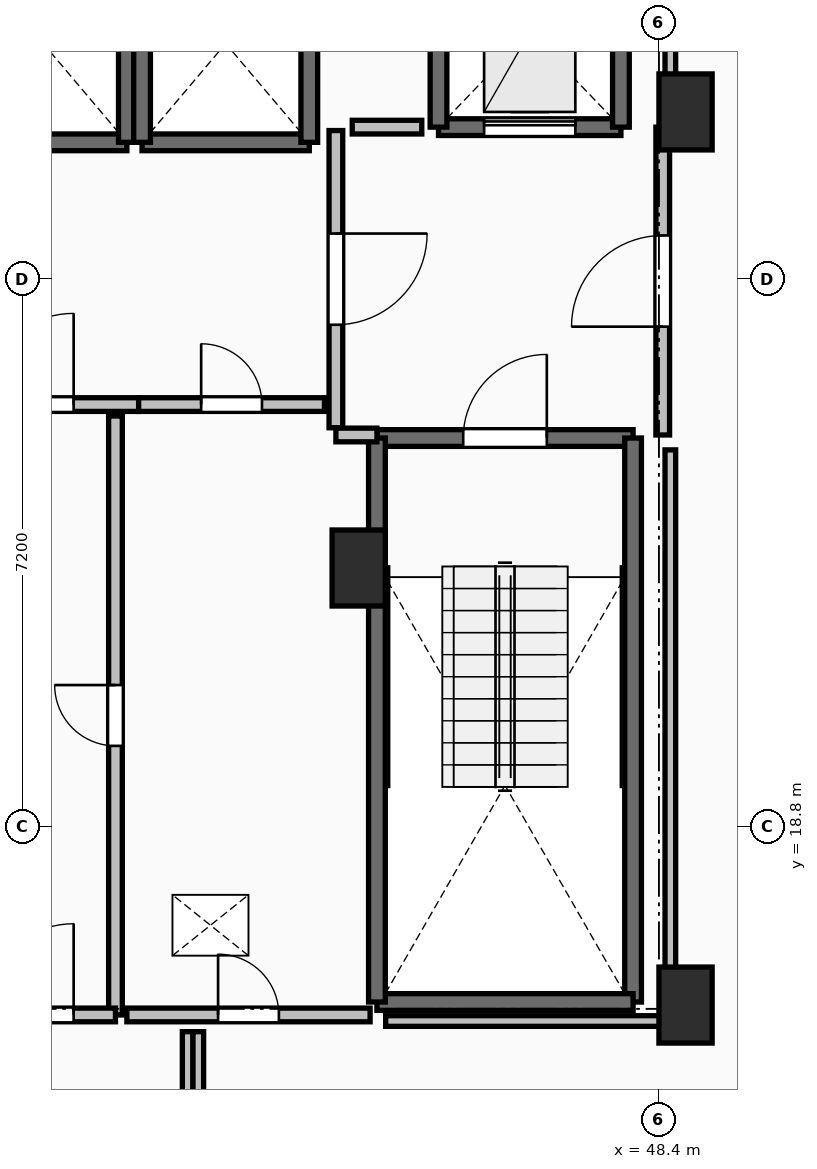
"""IFC4 building model, lengths in metres.
Left out: names, types, materials, properties, quantities, classifications, styles, units other than length and angle.
Written with IfcOpenShell. Run it as: python <this file> out.ifc"""

import sys

from ifc_helpers import new_model, si_unit, direction, frame, frame_2d, origin, origin_2d, place, context, subcontext, project, spatial, rectangle, extrude, element, fill, save


model = new_model("IFC4")
c1 = context("Model", 3, precision=1e-05, world=origin(), true_north=direction((0.0, 1.0)))
c2 = subcontext(c1, "Body", "Model", "MODEL_VIEW")
j1 = project(units=[si_unit("LENGTHUNIT", "METRE"), si_unit("PLANEANGLEUNIT", "RADIAN")], contexts=[c1])
p1 = place(None, origin())
s1 = spatial("IfcSite", under=j1, at=p1, CompositionType="ELEMENT")
p2 = place(p1, origin())
s2 = spatial("IfcBuilding", under=s1, at=p2, CompositionType="ELEMENT")
p3 = place(p2, frame((0.0, 0.0, 203.65)))
s3 = spatial("IfcBuildingStorey", under=s2, at=p3, CompositionType="ELEMENT", Elevation=203.65)
for number, where, z_axis, x_axis in (
    (1, (48.75, 28.2, 0.0), (0.0, 0.0, 1.0), (1.0, 0.0, 0.0)),
    (2, (48.75, 16.45, 0.0), (0.0, 0.0, 1.0), (1.0, 0.0, 0.0)),
    (3, (44.45, 22.2, 0.0), (0.0, 0.0, 1.0), (1.0, 0.0, 0.0)),
):
    element("IfcColumn", number, at=place(p3, frame(where, z_axis=z_axis, x_axis=x_axis)), inside=s3, PredefinedType="PILASTER", context=c2, shape_type="SweptSolid", body=[
        extrude(rectangle(XDim=0.7, YDim=1.0, at=origin_2d()), origin(), (0.0, 0.0, 1.0), 3.55),
    ])
p4 = place(p3, frame((44.69, 23.91, 0.0), z_axis=(0.0, 0.0, 1.0), x_axis=(1.0, 0.0, 0.0)))
e4 = element("IfcWall", 4, at=p4, inside=s3, PredefinedType="SOLIDWALL", context=c2, shape_type="SweptSolid", body=[
    extrude(rectangle(XDim=3.37, YDim=0.22, at=frame_2d((1.685, 0.0))), origin(), (0.0, 0.0, 1.0), 3.29),
])
p5 = place(p4, frame((1.135, 0.0, 0.0)))
e5 = element("IfcOpeningElement", 5, at=p5, cuts=e4, PredefinedType="OPENING", context=c2, shape_type="SweptSolid", body=[
    extrude(rectangle(XDim=1.1, YDim=2.15, at=frame_2d((0.55, 1.075))), frame((0.0, 0.125, 0.0), z_axis=(0.0, -1.0, 0.0), x_axis=(1.0, 0.0, 0.0)), (0.0, 0.0, 1.0), 0.25),
])
p6 = place(p3, frame((48.06, 23.91, 0.0), z_axis=(0.0, 0.0, 1.0), x_axis=(0.0, -1.0, 0.0)))
e6 = element("IfcWall", 6, at=p6, inside=s3, PredefinedType="SOLIDWALL", context=c2, shape_type="SweptSolid", body=[
    extrude(rectangle(XDim=7.42, YDim=0.22, at=frame_2d((3.71, 0.0))), origin(), (0.0, 0.0, 1.0), 3.29),
])
p7 = place(p3, frame((48.06, 16.49, 0.0), z_axis=(0.0, 0.0, 1.0), x_axis=(-1.0, 0.0, 0.0)))
e7 = element("IfcWall", 7, at=p7, inside=s3, PredefinedType="SOLIDWALL", context=c2, shape_type="SweptSolid", body=[
    extrude(rectangle(XDim=3.37, YDim=0.22, at=frame_2d((1.685, 0.0))), origin(), (0.0, 0.0, 1.0), 3.29),
])
p8 = place(p3, frame((44.69, 16.49, 0.0), z_axis=(0.0, 0.0, 1.0), x_axis=(0.0, 1.0, 0.0)))
e8 = element("IfcWall", 8, at=p8, inside=s3, PredefinedType="SOLIDWALL", context=c2, shape_type="SweptSolid", body=[
    extrude(rectangle(XDim=7.42, YDim=0.22, at=frame_2d((3.71, 0.0))), origin(), (0.0, 0.0, 1.0), 3.29),
])
p9 = place(p3, frame((39.2, 27.8, 0.0), z_axis=(0.0, 0.0, 1.0), x_axis=(1.0, 0.0, 0.0)))
e9 = element("IfcWall", 9, at=p9, inside=s3, PredefinedType="SOLIDWALL", context=c2, shape_type="SweptSolid", body=[
    extrude(rectangle(XDim=2.2, YDim=0.22, at=frame_2d((1.1, 0.0))), origin(), (0.0, 0.0, 1.0), 3.29),
])
p10 = place(p3, frame((41.4, 27.8, 0.0), z_axis=(0.0, 0.0, 1.0), x_axis=(0.0, 1.0, 0.0)))
e10 = element("IfcWall", 10, at=p10, inside=s3, PredefinedType="SOLIDWALL", context=c2, shape_type="SweptSolid", body=[
    extrude(rectangle(XDim=2.6, YDim=0.22, at=frame_2d((1.3, 0.0))), origin(), (0.0, 0.0, 1.0), 3.29),
])
p11 = place(p3, frame((41.6, 27.8, 0.0), z_axis=(0.0, 0.0, 1.0), x_axis=(1.0, 0.0, 0.0)))
e11 = element("IfcWall", 11, at=p11, inside=s3, PredefinedType="SOLIDWALL", context=c2, shape_type="SweptSolid", body=[
    extrude(rectangle(XDim=2.2, YDim=0.22, at=frame_2d((1.1, 0.0))), origin(), (0.0, 0.0, 1.0), 3.29),
])
for number, where, z_axis, x_axis in (
    (12, (43.8, 27.8, 0.0), (0.0, 0.0, 1.0), (0.0, 1.0, 0.0)),
    (13, (41.6, 30.4, 0.0), (0.0, 0.0, 1.0), (0.0, -1.0, 0.0)),
):
    element("IfcWall", number, at=place(p3, frame(where, z_axis=z_axis, x_axis=x_axis)), inside=s3, PredefinedType="SOLIDWALL", context=c2, shape_type="SweptSolid", body=[
        extrude(rectangle(XDim=2.6, YDim=0.22, at=frame_2d((1.3, 0.0))), origin(), (0.0, 0.0, 1.0), 3.29),
    ])
p12 = place(p3, frame((45.5, 28.0, 0.0), z_axis=(0.0, 0.0, 1.0), x_axis=(1.0, 0.0, 0.0)))
e14 = element("IfcWall", 14, at=p12, inside=s3, PredefinedType="SHEAR", context=c2, shape_type="SweptSolid", body=[
    extrude(rectangle(XDim=2.4, YDim=0.22, at=frame_2d((1.2, 0.0))), origin(), (0.0, 0.0, 1.0), 3.29),
])
p13 = place(p12, frame((0.6, 0.0, 0.0)))
e15 = element("IfcOpeningElement", 15, at=p13, cuts=e14, PredefinedType="OPENING", context=c2, shape_type="SweptSolid", body=[
    extrude(rectangle(XDim=1.2, YDim=2.2, at=frame_2d((0.6, 1.1))), frame((0.0, 0.125, 0.0), z_axis=(0.0, -1.0, 0.0), x_axis=(1.0, 0.0, 0.0)), (0.0, 0.0, 1.0), 0.25),
])
for number, where, z_axis, x_axis in (
    (16, (47.9, 28.0, 0.0), (0.0, 0.0, 1.0), (0.0, 1.0, 0.0)),
    (17, (45.5, 30.5, 0.0), (0.0, 0.0, 1.0), (0.0, -1.0, 0.0)),
):
    element("IfcWall", number, at=place(p3, frame(where, z_axis=z_axis, x_axis=x_axis)), inside=s3, PredefinedType="SHEAR", context=c2, shape_type="SweptSolid", body=[
        extrude(rectangle(XDim=2.5, YDim=0.22, at=frame_2d((1.25, 0.0))), origin(), (0.0, 0.0, 1.0), 3.29),
    ])
p14 = place(p3, frame((44.15, 27.955, 0.0), z_axis=(0.0, 0.0, 1.0), x_axis=(0.0, -1.0, 0.0)))
e18 = element("IfcWall", 18, at=p14, inside=s3, PredefinedType="PARTITIONING", context=c2, shape_type="SweptSolid", body=[
    extrude(rectangle(XDim=3.91, YDim=0.18, at=frame_2d((1.955, 0.0))), origin(), (0.0, 0.0, 1.0), 3.29),
])
p15 = place(p14, frame((1.355, 0.0, 0.0)))
e19 = element("IfcOpeningElement", 19, at=p15, cuts=e18, PredefinedType="OPENING", context=c2, shape_type="SweptSolid", body=[
    extrude(rectangle(XDim=1.2, YDim=2.15, at=frame_2d((0.6, 1.075))), frame((0.0, 0.105, 0.0), z_axis=(0.0, -1.0, 0.0), x_axis=(1.0, 0.0, 0.0)), (0.0, 0.0, 1.0), 0.21),
])
p16 = place(p3, frame((44.15, 23.95, 0.0), z_axis=(0.0, 0.0, 1.0), x_axis=(1.0, 0.0, 0.0)))
e20 = element("IfcWall", 20, at=p16, inside=s3, PredefinedType="PARTITIONING", context=c2, shape_type="SweptSolid", body=[
    extrude(rectangle(XDim=0.54, YDim=0.18, at=frame_2d((0.27, 0.0))), origin(), (0.0, 0.0, 1.0), 3.29),
])
p17 = place(p3, frame((48.45, 23.95, 0.0), z_axis=(0.0, 0.0, 1.0), x_axis=(0.0, 1.0, 0.0)))
e21 = element("IfcWall", 21, at=p17, inside=s3, PredefinedType="PARTITIONING", context=c2, shape_type="SweptSolid", body=[
    extrude(rectangle(XDim=4.05, YDim=0.18, at=frame_2d((2.025, 0.0))), origin(), (0.0, 0.0, 1.0), 3.29),
])
p18 = place(p17, frame((1.425, 0.0, 0.0)))
e22 = element("IfcOpeningElement", 22, at=p18, cuts=e21, PredefinedType="OPENING", context=c2, shape_type="SweptSolid", body=[
    extrude(rectangle(XDim=1.2, YDim=2.15, at=frame_2d((0.6, 1.075))), frame((0.0, 0.105, 0.0), z_axis=(0.0, -1.0, 0.0), x_axis=(1.0, 0.0, 0.0)), (0.0, 0.0, 1.0), 0.21),
])
p19 = place(p3, frame((38.645, 24.35, 0.0), z_axis=(0.0, 0.0, 1.0), x_axis=(1.0, 0.0, 0.0)))
e23 = element("IfcWall", 23, at=p19, inside=s3, PredefinedType="PARTITIONING", context=c2, shape_type="SweptSolid", body=[
    extrude(rectangle(XDim=2.91, YDim=0.18, at=frame_2d((1.455, 0.0))), origin(), (0.0, 0.0, 1.0), 3.29),
])
p20 = place(p19, frame((0.855, 0.0, 0.0)))
e24 = element("IfcOpeningElement", 24, at=p20, cuts=e23, PredefinedType="OPENING", context=c2, shape_type="SweptSolid", body=[
    extrude(rectangle(XDim=1.2, YDim=2.15, at=frame_2d((0.6, 1.075))), frame((0.0, 0.105, 0.0), z_axis=(0.0, -1.0, 0.0), x_axis=(1.0, 0.0, 0.0)), (0.0, 0.0, 1.0), 0.21),
])
p21 = place(p3, frame((41.555, 24.35, 0.0), z_axis=(0.0, 0.0, 1.0), x_axis=(1.0, 0.0, 0.0)))
e25 = element("IfcWall", 25, at=p21, inside=s3, PredefinedType="PARTITIONING", context=c2, shape_type="SweptSolid", body=[
    extrude(rectangle(XDim=2.445, YDim=0.18, at=frame_2d((1.223, 0.0))), origin(), (0.0, 0.0, 1.0), 3.29),
])
p22 = place(p21, frame((0.823, 0.0, 0.0)))
e26 = element("IfcOpeningElement", 26, at=p22, cuts=e25, PredefinedType="OPENING", context=c2, shape_type="SweptSolid", body=[
    extrude(rectangle(XDim=0.8, YDim=2.05, at=frame_2d((0.4, 1.025))), frame((0.0, 0.105, 0.0), z_axis=(0.0, -1.0, 0.0), x_axis=(1.0, 0.0, 0.0)), (0.0, 0.0, 1.0), 0.21),
])
p23 = place(p3, frame((41.25, 16.32, 0.0), z_axis=(0.0, 0.0, 1.0), x_axis=(0.0, 1.0, 0.0)))
e27 = element("IfcWall", 27, at=p23, inside=s3, PredefinedType="PARTITIONING", context=c2, shape_type="SweptSolid", body=[
    extrude(rectangle(XDim=7.88, YDim=0.18, at=frame_2d((3.94, 0.0))), origin(), (0.0, 0.0, 1.0), 3.29),
])
p24 = place(p23, frame((3.54, 0.0, 0.0)))
e28 = element("IfcOpeningElement", 28, at=p24, cuts=e27, PredefinedType="OPENING", context=c2, shape_type="SweptSolid", body=[
    extrude(rectangle(XDim=0.8, YDim=2.05, at=frame_2d((0.4, 1.025))), frame((0.0, 0.105, 0.0), z_axis=(0.0, -1.0, 0.0), x_axis=(1.0, 0.0, 0.0)), (0.0, 0.0, 1.0), 0.21),
])
p25 = place(p3, frame((38.95, 16.32, 0.0), z_axis=(0.0, 0.0, 1.0), x_axis=(1.0, 0.0, 0.0)))
e29 = element("IfcWall", 29, at=p25, inside=s3, PredefinedType="PARTITIONING", context=c2, shape_type="SweptSolid", body=[
    extrude(rectangle(XDim=2.3, YDim=0.18, at=frame_2d((1.15, 0.0))), origin(), (0.0, 0.0, 1.0), 3.29),
])
p26 = place(p25, frame((0.55, 0.0, 0.0)))
e30 = element("IfcOpeningElement", 30, at=p26, cuts=e29, PredefinedType="OPENING", context=c2, shape_type="SweptSolid", body=[
    extrude(rectangle(XDim=1.2, YDim=2.15, at=frame_2d((0.6, 1.075))), frame((0.0, 0.105, 0.0), z_axis=(0.0, -1.0, 0.0), x_axis=(1.0, 0.0, 0.0)), (0.0, 0.0, 1.0), 0.21),
])
p27 = place(p3, frame((41.4, 16.32, 0.0), z_axis=(0.0, 0.0, 1.0), x_axis=(1.0, 0.0, 0.0)))
e31 = element("IfcWall", 31, at=p27, inside=s3, PredefinedType="PARTITIONING", context=c2, shape_type="SweptSolid", body=[
    extrude(rectangle(XDim=3.2, YDim=0.18, at=frame_2d((1.6, 0.0))), origin(), (0.0, 0.0, 1.0), 3.29),
])
p28 = place(p27, frame((1.2, 0.0, 0.0)))
e32 = element("IfcOpeningElement", 32, at=p28, cuts=e31, PredefinedType="OPENING", context=c2, shape_type="SweptSolid", body=[
    extrude(rectangle(XDim=0.8, YDim=2.05, at=frame_2d((0.4, 1.025))), frame((0.0, 0.105, 0.0), z_axis=(0.0, -1.0, 0.0), x_axis=(1.0, 0.0, 0.0)), (0.0, 0.0, 1.0), 0.21),
])
p29 = place(p3, frame((45.28, 28.0, 0.0), z_axis=(0.0, 0.0, 1.0), x_axis=(-1.0, 0.0, 0.0)))
e33 = element("IfcWall", 33, at=p29, inside=s3, PredefinedType="PARTITIONING", context=c2, shape_type="SweptSolid", body=[
    extrude(rectangle(XDim=0.915, YDim=0.18, at=frame_2d((0.458, 0.0))), origin(), (0.0, 0.0, 1.0), 3.29),
])
p30 = place(p3, frame((48.55, 16.24, 0.0), z_axis=(0.0, 0.0, 1.0), x_axis=(0.0, 1.0, 0.0)))
e34 = element("IfcWall", 34, at=p30, inside=s3, PredefinedType="PARTITIONING", context=c2, shape_type="SweptSolid", body=[
    extrude(rectangle(XDim=7.514, YDim=0.14, at=frame_2d((3.757, 0.0))), origin(), (0.0, 0.0, 1.0), 2.482),
])
p31 = place(p3, frame((48.55, 28.196, 0.0), z_axis=(0.0, 0.0, 1.0), x_axis=(0.0, 1.0, 0.0)))
e35 = element("IfcWall", 35, at=p31, inside=s3, PredefinedType="PARTITIONING", context=c2, shape_type="SweptSolid", body=[
    extrude(rectangle(XDim=5.254, YDim=0.14, at=frame_2d((2.627, 0.0))), origin(), (0.0, 0.0, 1.0), 2.482),
])
for number, where, z_axis, x_axis in (
    (36, (42.2, 16.1, 0.0), (0.0, 0.0, 1.0), (0.0, -1.0, 0.0)),
    (37, (42.34, 14.27, 0.0), (0.0, 0.0, 1.0), (0.0, 1.0, 0.0)),
):
    element("IfcWall", number, at=place(p3, frame(where, z_axis=z_axis, x_axis=x_axis)), inside=s3, PredefinedType="PARTITIONING", context=c2, shape_type="SweptSolid", body=[
        extrude(rectangle(XDim=1.83, YDim=0.14, at=frame_2d((0.915, 0.0))), origin(), (0.0, 0.0, 1.0), 3.29),
    ])
p32 = place(p3, frame((44.805, 16.24, 0.0), z_axis=(0.0, 0.0, 1.0), x_axis=(1.0, 0.0, 0.0)))
e38 = element("IfcWall", 38, at=p32, inside=s3, PredefinedType="PARTITIONING", context=c2, shape_type="SweptSolid", body=[
    extrude(rectangle(XDim=3.745, YDim=0.14, at=frame_2d((1.873, 0.0))), origin(), (0.0, 0.0, 1.0), 2.482),
])
p33 = place(p5, origin())
e39 = element("IfcDoor", 39, at=p33, inside=s3, OperationType="SINGLE_SWING_RIGHT", PredefinedType="DOOR", context=c2, shape_type="SweptSolid", body=[
    extrude(rectangle(XDim=1.1, YDim=2.15, at=frame_2d((0.55, 1.075))), frame((0.0, 0.025, 0.0), z_axis=(0.0, -1.0, 0.0), x_axis=(1.0, 0.0, 0.0)), (0.0, 0.0, 1.0), 0.05),
])
fill(e5, e39)
p34 = place(p13, origin())
e40 = element("IfcDoor", 40, at=p34, inside=s3, OperationType="SLIDING_TO_LEFT", PredefinedType="DOOR", context=c2, shape_type="SweptSolid", body=[
    extrude(rectangle(XDim=1.2, YDim=2.2, at=frame_2d((0.6, 1.1))), frame((0.0, 0.025, 0.0), z_axis=(0.0, -1.0, 0.0), x_axis=(1.0, 0.0, 0.0)), (0.0, 0.0, 1.0), 0.05),
])
fill(e15, e40)
p35 = place(p15, origin())
e41 = element("IfcDoor", 41, at=p35, inside=s3, OperationType="SINGLE_SWING_LEFT", PredefinedType="DOOR", context=c2, shape_type="SweptSolid", body=[
    extrude(rectangle(XDim=1.2, YDim=2.15, at=frame_2d((0.6, 1.075))), frame((0.0, 0.025, 0.0), z_axis=(0.0, -1.0, 0.0), x_axis=(1.0, 0.0, 0.0)), (0.0, 0.0, 1.0), 0.05),
])
fill(e19, e41)
p36 = place(p18, origin())
e42 = element("IfcDoor", 42, at=p36, inside=s3, OperationType="SINGLE_SWING_LEFT", PredefinedType="DOOR", context=c2, shape_type="SweptSolid", body=[
    extrude(rectangle(XDim=1.2, YDim=2.15, at=frame_2d((0.6, 1.075))), frame((0.0, 0.025, 0.0), z_axis=(0.0, -1.0, 0.0), x_axis=(1.0, 0.0, 0.0)), (0.0, 0.0, 1.0), 0.05),
])
fill(e22, e42)
p37 = place(p20, origin())
e43 = element("IfcDoor", 43, at=p37, inside=s3, OperationType="SINGLE_SWING_RIGHT", PredefinedType="DOOR", context=c2, shape_type="SweptSolid", body=[
    extrude(rectangle(XDim=1.2, YDim=2.15, at=frame_2d((0.6, 1.075))), frame((0.0, 0.025, 0.0), z_axis=(0.0, -1.0, 0.0), x_axis=(1.0, 0.0, 0.0)), (0.0, 0.0, 1.0), 0.05),
])
fill(e24, e43)
p38 = place(p22, origin())
e44 = element("IfcDoor", 44, at=p38, inside=s3, OperationType="SINGLE_SWING_LEFT", PredefinedType="DOOR", context=c2, shape_type="SweptSolid", body=[
    extrude(rectangle(XDim=0.8, YDim=2.05, at=frame_2d((0.4, 1.025))), frame((0.0, 0.025, 0.0), z_axis=(0.0, -1.0, 0.0), x_axis=(1.0, 0.0, 0.0)), (0.0, 0.0, 1.0), 0.05),
])
fill(e26, e44)
p39 = place(p24, origin())
e45 = element("IfcDoor", 45, at=p39, inside=s3, OperationType="SINGLE_SWING_RIGHT", PredefinedType="DOOR", context=c2, shape_type="SweptSolid", body=[
    extrude(rectangle(XDim=0.8, YDim=2.05, at=frame_2d((0.4, 1.025))), frame((0.0, 0.025, 0.0), z_axis=(0.0, -1.0, 0.0), x_axis=(1.0, 0.0, 0.0)), (0.0, 0.0, 1.0), 0.05),
])
fill(e28, e45)
p40 = place(p26, origin())
e46 = element("IfcDoor", 46, at=p40, inside=s3, OperationType="SINGLE_SWING_RIGHT", PredefinedType="DOOR", context=c2, shape_type="SweptSolid", body=[
    extrude(rectangle(XDim=1.2, YDim=2.15, at=frame_2d((0.6, 1.075))), frame((0.0, 0.025, 0.0), z_axis=(0.0, -1.0, 0.0), x_axis=(1.0, 0.0, 0.0)), (0.0, 0.0, 1.0), 0.05),
])
fill(e30, e46)
p41 = place(p28, origin())
e47 = element("IfcDoor", 47, at=p41, inside=s3, OperationType="SINGLE_SWING_LEFT", PredefinedType="DOOR", context=c2, shape_type="SweptSolid", body=[
    extrude(rectangle(XDim=0.8, YDim=2.05, at=frame_2d((0.4, 1.025))), frame((0.0, 0.025, 0.0), z_axis=(0.0, -1.0, 0.0), x_axis=(1.0, 0.0, 0.0)), (0.0, 0.0, 1.0), 0.05),
])
fill(e32, e47)
save(model, sys.argv[1])
